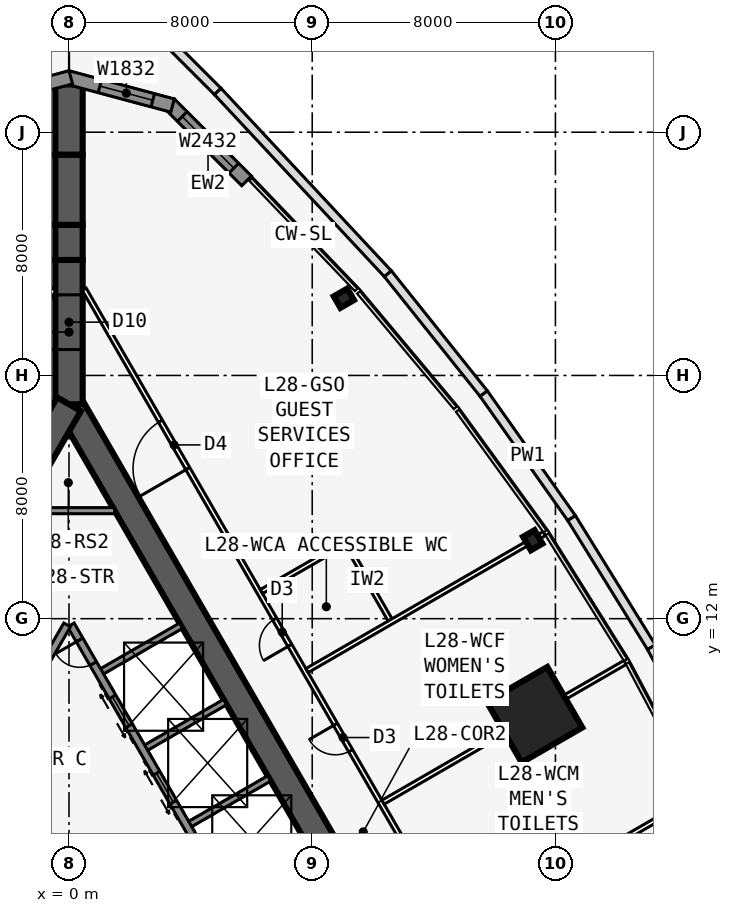
"""IFC4 building model, lengths in metres.
Left out: names, types, materials, properties, quantities, classifications, styles, units other than length and angle.
Written with IfcOpenShell. Run it as: python <this file> out.ifc"""

import sys

from ifc_helpers import new_model, si_unit, direction, frame, frame_2d, origin, origin_2d, place, context, subcontext, project, spatial, polyline, rectangle, i_section, outline, extrude, element, fill, save


model = new_model("IFC4")
c1 = context("Model", 3, precision=1e-05, world=origin(), true_north=direction((0.0, 1.0)))
c2 = subcontext(c1, "Body", "Model", "MODEL_VIEW")
j1 = project(units=[si_unit("LENGTHUNIT", "METRE"), si_unit("PLANEANGLEUNIT", "RADIAN")], contexts=[c1])
p1 = place(None, origin())
s1 = spatial("IfcSite", under=j1, at=p1, CompositionType="ELEMENT")
p2 = place(p1, origin())
s2 = spatial("IfcBuilding", under=s1, at=p2, CompositionType="ELEMENT")
p3 = place(p2, frame((0.0, 0.0, 109.7)))
s3 = spatial("IfcBuildingStorey", under=s2, at=p3, CompositionType="ELEMENT", Elevation=109.7)
p4 = place(p3, frame((16.5, -9.526, 0.0), z_axis=(0.0, 0.0, 1.0), x_axis=(-0.499999749417, 0.866025548458, 0.0)))
e1 = element("IfcWall", 1, at=p4, inside=s3, PredefinedType="SHEAR", context=c2, shape_type="SweptSolid", body=[
    extrude(rectangle(XDim=33.0, YDim=0.9, at=frame_2d((16.5, 0.0))), origin(), (0.0, 0.0, 1.0), 5.0),
])
p5 = place(p4, frame((14.15, 0.0, 0.0)))
e2 = element("IfcOpeningElement", 2, at=p5, cuts=e1, PredefinedType="OPENING", context=c2, shape_type="SweptSolid", body=[
    extrude(rectangle(XDim=1.8, YDim=2.13, at=frame_2d((0.9, 1.065))), frame((0.0, 0.46, 0.0), z_axis=(0.0, -1.0, 0.0), x_axis=(1.0, 0.0, 0.0)), (0.0, 0.0, 1.0), 0.92),
])
p6 = place(p4, frame((12.6, 0.0, 0.0)))
e3 = element("IfcOpeningElement", 3, at=p6, cuts=e1, PredefinedType="OPENING", context=c2, shape_type="SweptSolid", body=[
    extrude(rectangle(XDim=1.0, YDim=2.13, at=frame_2d((0.5, 1.065))), frame((0.0, 0.46, 0.0), z_axis=(0.0, -1.0, 0.0), x_axis=(1.0, 0.0, 0.0)), (0.0, 0.0, 1.0), 0.92),
])
p7 = place(p3, frame((5.379, 2.586, 0.0), z_axis=(0.0, 0.0, 1.0), x_axis=(-0.500001375892, 0.866024609411, 0.0)))
e4 = element("IfcWall", 4, at=p7, inside=s3, PredefinedType="SOLIDWALL", context=c2, shape_type="SweptSolid", body=[
    extrude(rectangle(XDim=10.633, YDim=0.25, at=frame_2d((5.316, 0.0))), origin(), (0.0, 0.0, 1.0), 4.835),
])
p8 = place(p7, frame((9.164, 0.0, 0.0)))
e5 = element("IfcOpeningElement", 5, at=p8, cuts=e4, PredefinedType="OPENING", context=c2, shape_type="SweptSolid", body=[
    extrude(rectangle(XDim=0.9, YDim=2.13, at=frame_2d((0.45, 1.065))), frame((0.0, 0.135, 0.0), z_axis=(0.0, -1.0, 0.0), x_axis=(1.0, 0.0, 0.0)), (0.0, 0.0, 1.0), 0.27),
])
p9 = place(p7, frame((1.0, 0.0, 0.0)))
e6 = element("IfcOpeningElement", 6, at=p9, cuts=e4, PredefinedType="OPENING", context=c2, shape_type="SweptSolid", body=[
    extrude(rectangle(XDim=1.1, YDim=2.13, at=frame_2d((0.55, 1.065))), frame((0.0, 0.135, 0.0), z_axis=(0.0, -1.0, 0.0), x_axis=(1.0, 0.0, 0.0)), (0.0, 0.0, 1.0), 0.27),
])
p10 = place(p7, frame((3.9, 0.0, 0.0)))
e7 = element("IfcOpeningElement", 7, at=p10, cuts=e4, PredefinedType="OPENING", context=c2, shape_type="SweptSolid", body=[
    extrude(rectangle(XDim=1.1, YDim=2.13, at=frame_2d((0.55, 1.065))), frame((0.0, 0.135, 0.0), z_axis=(0.0, -1.0, 0.0), x_axis=(1.0, 0.0, 0.0)), (0.0, 0.0, 1.0), 0.27),
])
p11 = place(p7, frame((6.8, 0.0, 0.0)))
e8 = element("IfcOpeningElement", 8, at=p11, cuts=e4, PredefinedType="OPENING", context=c2, shape_type="SweptSolid", body=[
    extrude(rectangle(XDim=1.1, YDim=2.13, at=frame_2d((0.55, 1.065))), frame((0.0, 0.135, 0.0), z_axis=(0.0, -1.0, 0.0), x_axis=(1.0, 0.0, 0.0)), (0.0, 0.0, 1.0), 0.27),
])
for number, where, z_axis, x_axis in (
    (9, (3.879, 5.184, 0.0), (0.0, 0.0, 1.0), (0.866, 0.5, 0.0)),
    (10, (2.429, 7.696, 0.0), (0.0, 0.0, 1.0), (0.866, 0.5, 0.0)),
    (11, (0.979, 10.207, 0.0), (0.0, 0.0, 1.0), (0.866, 0.5, 0.0)),
):
    element("IfcWall", number, at=place(p3, frame(where, z_axis=z_axis, x_axis=x_axis)), inside=s3, PredefinedType="SOLIDWALL", context=c2, shape_type="SweptSolid", body=[
        extrude(rectangle(XDim=3.125, YDim=0.2, at=frame_2d((1.562, 0.0))), origin(), (0.0, 0.0, 1.0), 4.835),
    ])
p12 = place(p3, frame((0.0, 19.052, 0.0), z_axis=(0.0, 0.0, 1.0), x_axis=(-0.499999749417, -0.866025548458, 0.0)))
e12 = element("IfcWall", 12, at=p12, inside=s3, PredefinedType="SHEAR", context=c2, shape_type="SweptSolid", body=[
    extrude(rectangle(XDim=33.0, YDim=0.9, at=frame_2d((16.5, 0.0))), origin(), (0.0, 0.0, 1.0), 5.0),
])
p13 = place(p12, frame((14.15, 0.0, 0.0)))
e13 = element("IfcOpeningElement", 13, at=p13, cuts=e12, PredefinedType="OPENING", context=c2, shape_type="SweptSolid", body=[
    extrude(rectangle(XDim=1.8, YDim=2.13, at=frame_2d((0.9, 1.065))), frame((0.0, 0.46, 0.0), z_axis=(0.0, -1.0, 0.0), x_axis=(1.0, 0.0, 0.0)), (0.0, 0.0, 1.0), 0.92),
])
p14 = place(p12, frame((12.6, 0.0, 0.0)))
e14 = element("IfcOpeningElement", 14, at=p14, cuts=e12, PredefinedType="OPENING", context=c2, shape_type="SweptSolid", body=[
    extrude(rectangle(XDim=1.0, YDim=2.13, at=frame_2d((0.5, 1.065))), frame((0.0, 0.46, 0.0), z_axis=(0.0, -1.0, 0.0), x_axis=(1.0, 0.0, 0.0)), (0.0, 0.0, 1.0), 0.92),
])
p15 = place(p3, frame((-0.062, 11.794, 0.0), z_axis=(0.0, 0.0, 1.0), x_axis=(-0.500006680225, -0.86602154692, 0.0)))
e15 = element("IfcWall", 15, at=p15, inside=s3, PredefinedType="SOLIDWALL", context=c2, shape_type="SweptSolid", body=[
    extrude(rectangle(XDim=7.733, YDim=0.25, at=frame_2d((3.866, 0.0))), origin(), (0.0, 0.0, 1.0), 4.835),
])
p16 = place(p3, frame((0.0, 19.052, 0.0), z_axis=(0.0, 0.0, 1.0), x_axis=(0.0, 1.0, 0.0)))
e16 = element("IfcWall", 16, at=p16, inside=s3, PredefinedType="SHEAR", context=c2, shape_type="SweptSolid", body=[
    extrude(rectangle(XDim=4.746, YDim=0.9, at=frame_2d((2.373, 0.0))), origin(), (0.0, 0.0, 1.0), 5.0),
])
p17 = place(p16, frame((1.8, 0.0, 0.0)))
e17 = element("IfcOpeningElement", 17, at=p17, cuts=e16, PredefinedType="OPENING", context=c2, shape_type="SweptSolid", body=[
    extrude(rectangle(XDim=1.8, YDim=2.13, at=frame_2d((0.9, 1.065))), frame((0.0, 0.46, 0.0), z_axis=(0.0, -1.0, 0.0), x_axis=(1.0, 0.0, 0.0)), (0.0, 0.0, 1.0), 0.92),
])
p18 = place(p3, frame((0.0, 23.799, 0.0), z_axis=(0.0, 0.0, 1.0), x_axis=(0.0, 1.0, 0.0)))
e18 = element("IfcWall", 18, at=p18, inside=s3, PredefinedType="SHEAR", context=c2, shape_type="SweptSolid", body=[
    extrude(rectangle(XDim=1.155, YDim=0.9, at=frame_2d((0.577, 0.0))), origin(), (0.0, 0.0, 1.0), 5.0),
])
p19 = place(p3, frame((0.0, 24.953, 0.0), z_axis=(0.0, 0.0, 1.0), x_axis=(0.0, 1.0, 0.0)))
e19 = element("IfcWall", 19, at=p19, inside=s3, PredefinedType="SHEAR", context=c2, shape_type="SweptSolid", body=[
    extrude(rectangle(XDim=2.309, YDim=0.9, at=frame_2d((1.155, 0.0))), origin(), (0.0, 0.0, 1.0), 5.0),
])
p20 = place(p3, frame((0.0, 27.263, 0.0), z_axis=(0.0, 0.0, 1.0), x_axis=(0.0, 1.0, 0.0)))
e20 = element("IfcWall", 20, at=p20, inside=s3, PredefinedType="SHEAR", context=c2, shape_type="SweptSolid", body=[
    extrude(rectangle(XDim=2.31, YDim=0.9, at=frame_2d((1.155, 0.0))), origin(), (0.0, 0.0, 1.0), 5.0),
])
for number, where, z_axis, x_axis in (
    (21, (15.254, 14.58, 0.0), (0.0, 0.0, 1.0), (0.866, 0.5, 0.0)),
    (22, (9.041, 22.541, 0.0), (0.0, 0.0, 1.0), (-0.5, 0.866, 0.0)),
):
    element("IfcColumn", number, at=place(p3, frame(where, z_axis=z_axis, x_axis=x_axis)), inside=s3, PredefinedType="COLUMN", context=c2, shape_type="SweptSolid", body=[
        extrude(i_section(OverallWidth=0.437, OverallDepth=0.513, WebThickness=0.061, FlangeThickness=0.097, at=origin_2d()), origin(), (0.0, 0.0, 1.0), 5.0),
    ])
p21 = place(p3, frame((15.312, 8.84, 0.0), z_axis=(0.0, 0.0, 1.0), x_axis=(0.866025403784, 0.5, 0.0)))
e23 = element("IfcColumn", 23, at=p21, inside=s3, PredefinedType="COLUMN", context=c2, shape_type="SweptSolid", body=[
    extrude(rectangle(XDim=2.3, YDim=2.3, at=origin_2d()), origin(), (0.0, 0.0, 1.0), 5.0),
])
p22 = place(p3, frame((5.841, 26.399, 0.0), z_axis=(0.0, 0.0, 1.0), x_axis=(-0.707106781187, 0.707106781187, 0.0)))
e24 = element("IfcWall", 24, at=p22, inside=s3, PredefinedType="SOLIDWALL", context=c2, shape_type="SweptSolid", body=[
    extrude(rectangle(XDim=3.586, YDim=0.45, at=frame_2d((1.793, 0.0))), origin(), (0.0, 0.0, 1.0), 4.835),
])
p23 = place(p22, frame((0.593, 0.0, 0.6)))
e25 = element("IfcOpeningElement", 25, at=p23, cuts=e24, PredefinedType="OPENING", context=c2, shape_type="SweptSolid", body=[
    extrude(rectangle(XDim=2.4, YDim=3.2, at=frame_2d((1.2, 1.6))), frame((0.0, 0.235, 0.0), z_axis=(0.0, -1.0, 0.0), x_axis=(1.0, 0.0, 0.0)), (0.0, 0.0, 1.0), 0.47),
])
p24 = place(p3, frame((3.406, 28.877, 0.0), z_axis=(0.0, 0.0, 1.0), x_axis=(-0.965924653531, 0.258823421857, 0.0)))
e26 = element("IfcWall", 26, at=p24, inside=s3, PredefinedType="SOLIDWALL", context=c2, shape_type="SweptSolid", body=[
    extrude(outline(polyline([(3.586, 0.225), (3.527, 0.225), (3.035, 0.093), (3.0, 0.225), (0.0, 0.225), (0.0, -0.225), (3.586, -0.225), (3.586, 0.225)])), origin(), (0.0, 0.0, 1.0), 4.835),
])
p25 = place(p24, frame((0.674, 0.0, 0.6)))
e27 = element("IfcOpeningElement", 27, at=p25, cuts=e26, PredefinedType="OPENING", context=c2, shape_type="SweptSolid", body=[
    extrude(rectangle(XDim=1.8, YDim=3.2, at=frame_2d((0.9, 1.6))), frame((0.0, 0.235, 0.0), z_axis=(0.0, -1.0, 0.0), x_axis=(1.0, 0.0, 0.0)), (0.0, 0.0, 1.0), 0.47),
])
p26 = place(p3, frame((0.058, 29.805, 0.0), z_axis=(0.0, 0.0, 1.0), x_axis=(-0.965924653531, -0.258823421857, 0.0)))
e28 = element("IfcWall", 28, at=p26, inside=s3, PredefinedType="SOLIDWALL", context=c2, shape_type="SweptSolid", body=[
    extrude(outline(polyline([(3.586, 0.225), (0.586, 0.225), (0.551, 0.093), (0.06, 0.225), (0.0, 0.225), (0.0, -0.225), (3.586, -0.225), (3.586, 0.225)])), origin(), (0.0, 0.0, 1.0), 4.835),
])
p27 = place(p26, frame((1.111, 0.0, 0.6)))
e29 = element("IfcOpeningElement", 29, at=p27, cuts=e28, PredefinedType="OPENING", context=c2, shape_type="SweptSolid", body=[
    extrude(rectangle(XDim=1.8, YDim=3.2, at=frame_2d((0.9, 1.6))), frame((0.0, 0.235, 0.0), z_axis=(0.0, -1.0, 0.0), x_axis=(1.0, 0.0, 0.0)), (0.0, 0.0, 1.0), 0.47),
])
p28 = place(p3, frame((2.809, 31.424, 0.0), z_axis=(0.0, 0.0, 1.0), x_axis=(0.707148220913, -0.707065339031, 0.0)))
e30 = element("IfcWall", 30, at=p28, inside=s3, PredefinedType="PARAPET", context=c2, shape_type="SweptSolid", body=[
    extrude(rectangle(XDim=2.946, YDim=0.3, at=frame_2d((1.473, 0.0))), origin(), (0.0, 0.0, 1.0), 1.1),
])
p29 = place(p3, frame((4.892, 29.341, 0.0), z_axis=(0.0, 0.0, 1.0), x_axis=(0.682295981494, -0.731076051883, 0.0)))
e31 = element("IfcWall", 31, at=p29, inside=s3, PredefinedType="PARAPET", context=c2, shape_type="SweptSolid", body=[
    extrude(rectangle(XDim=8.203, YDim=0.3, at=frame_2d((4.102, 0.0))), origin(), (0.0, 0.0, 1.0), 1.1),
])
p30 = place(p3, frame((10.489, 23.344, 0.0), z_axis=(0.0, 0.0, 1.0), x_axis=(0.624606561164, -0.780939590334, 0.0)))
e32 = element("IfcWall", 32, at=p30, inside=s3, PredefinedType="PARAPET", context=c2, shape_type="SweptSolid", body=[
    extrude(rectangle(XDim=5.047, YDim=0.3, at=frame_2d((2.524, 0.0))), origin(), (0.0, 0.0, 1.0), 1.1),
])
p31 = place(p3, frame((13.642, 19.402, 0.0), z_axis=(0.0, 0.0, 1.0), x_axis=(0.576639207024, -0.816998913661, 0.0)))
e33 = element("IfcWall", 33, at=p31, inside=s3, PredefinedType="PARAPET", context=c2, shape_type="SweptSolid", body=[
    extrude(rectangle(XDim=5.012, YDim=0.3, at=frame_2d((2.506, 0.0))), origin(), (0.0, 0.0, 1.0), 1.1),
])
p32 = place(p3, frame((16.531, 15.308, 0.0), z_axis=(0.0, 0.0, 1.0), x_axis=(0.526139147264, -0.850398493482, 0.0)))
e34 = element("IfcWall", 34, at=p32, inside=s3, PredefinedType="PARAPET", context=c2, shape_type="SweptSolid", body=[
    extrude(rectangle(XDim=4.993, YDim=0.3, at=frame_2d((2.497, 0.0))), origin(), (0.0, 0.0, 1.0), 1.1),
])
p33 = place(p3, frame((19.159, 11.061, 0.0), z_axis=(0.0, 0.0, 1.0), x_axis=(0.473402806561, -0.880846060751, 0.0)))
e35 = element("IfcWall", 35, at=p33, inside=s3, PredefinedType="PARAPET", context=c2, shape_type="SweptSolid", body=[
    extrude(rectangle(XDim=4.993, YDim=0.3, at=frame_2d((2.497, 0.0))), origin(), (0.0, 0.0, 1.0), 1.1),
])
p34 = place(p3, frame((20.027, -10.985, 0.0), z_axis=(0.0, 0.0, 1.0), x_axis=(-0.500001677587, 0.866024435227, 0.0)))
e36 = element("IfcWall", 36, at=p34, inside=s3, PredefinedType="PARTITIONING", context=c2, shape_type="SweptSolid", body=[
    extrude(rectangle(XDim=39.054, YDim=0.15, at=frame_2d((19.527, 0.0))), origin(), (0.0, 0.0, 1.0), 4.835),
])
p35 = place(p34, frame((6.513, 0.0, 0.0)))
e37 = element("IfcOpeningElement", 37, at=p35, cuts=e36, PredefinedType="OPENING", context=c2, shape_type="SweptSolid", body=[
    extrude(rectangle(XDim=1.8, YDim=2.13, at=frame_2d((0.9, 1.065))), frame((0.0, 0.085, 0.0), z_axis=(0.0, -1.0, 0.0), x_axis=(1.0, 0.0, 0.0)), (0.0, 0.0, 1.0), 0.17),
])
p36 = place(p34, frame((16.527, 0.0, 0.0)))
e38 = element("IfcOpeningElement", 38, at=p36, cuts=e36, PredefinedType="OPENING", context=c2, shape_type="SweptSolid", body=[
    extrude(rectangle(XDim=1.0, YDim=2.13, at=frame_2d((0.5, 1.065))), frame((0.0, 0.085, 0.0), z_axis=(0.0, -1.0, 0.0), x_axis=(1.0, 0.0, 0.0)), (0.0, 0.0, 1.0), 0.17),
])
p37 = place(p34, frame((21.527, 0.0, 0.0)))
e39 = element("IfcOpeningElement", 39, at=p37, cuts=e36, PredefinedType="OPENING", context=c2, shape_type="SweptSolid", body=[
    extrude(rectangle(XDim=1.0, YDim=2.13, at=frame_2d((0.5, 1.065))), frame((0.0, 0.085, 0.0), z_axis=(0.0, -1.0, 0.0), x_axis=(1.0, 0.0, 0.0)), (0.0, 0.0, 1.0), 0.17),
])
p38 = place(p34, frame((25.527, 0.0, 0.0)))
e40 = element("IfcOpeningElement", 40, at=p38, cuts=e36, PredefinedType="OPENING", context=c2, shape_type="SweptSolid", body=[
    extrude(rectangle(XDim=1.0, YDim=2.13, at=frame_2d((0.5, 1.065))), frame((0.0, 0.085, 0.0), z_axis=(0.0, -1.0, 0.0), x_axis=(1.0, 0.0, 0.0)), (0.0, 0.0, 1.0), 0.17),
])
p39 = place(p34, frame((32.24, 0.0, 0.0)))
e41 = element("IfcOpeningElement", 41, at=p39, cuts=e36, PredefinedType="OPENING", context=c2, shape_type="SweptSolid", body=[
    extrude(rectangle(XDim=1.8, YDim=2.13, at=frame_2d((0.9, 1.065))), frame((0.0, 0.085, 0.0), z_axis=(0.0, -1.0, 0.0), x_axis=(1.0, 0.0, 0.0)), (0.0, 0.0, 1.0), 0.17),
])
p40 = place(p3, frame((12.829, 1.633, 0.0), z_axis=(0.0, 0.0, 1.0), x_axis=(0.866028563435, 0.499994527285, 0.0)))
e42 = element("IfcWall", 42, at=p40, inside=s3, PredefinedType="PARTITIONING", context=c2, shape_type="SweptSolid", body=[
    extrude(rectangle(XDim=9.01, YDim=0.15, at=frame_2d((4.505, 0.0))), origin(), (0.0, 0.0, 1.0), 3.989),
])
p41 = place(p3, frame((10.329, 5.963, 0.0), z_axis=(0.0, 0.0, 1.0), x_axis=(0.866017936952, 0.500012932711, 0.0)))
e43 = element("IfcWall", 43, at=p41, inside=s3, PredefinedType="PARTITIONING", context=c2, shape_type="SweptSolid", body=[
    extrude(rectangle(XDim=9.191, YDim=0.15, at=frame_2d((4.596, 0.0))), origin(), (0.0, 0.0, 1.0), 3.989),
])
p42 = place(p3, frame((7.829, 10.293, 0.0), z_axis=(0.0, 0.0, 1.0), x_axis=(0.866010056275, 0.500026581724, 0.0)))
e44 = element("IfcWall", 44, at=p42, inside=s3, PredefinedType="PARTITIONING", context=c2, shape_type="SweptSolid", body=[
    extrude(rectangle(XDim=9.01, YDim=0.15, at=frame_2d((4.505, 0.0))), origin(), (0.0, 0.0, 1.0), 3.989),
])
p43 = place(p3, frame((10.562, 11.958, 0.0), z_axis=(0.0, 0.0, 1.0), x_axis=(-0.499990139034, 0.866031096941, 0.0)))
e45 = element("IfcWall", 45, at=p43, inside=s3, PredefinedType="PARTITIONING", context=c2, shape_type="SweptSolid", body=[
    extrude(rectangle(XDim=3.0, YDim=0.15, at=frame_2d((1.5, 0.0))), origin(), (0.0, 0.0, 1.0), 4.835),
])
p44 = place(p3, frame((6.329, 12.891, 0.0), z_axis=(0.0, 0.0, 1.0), x_axis=(0.866022959057, 0.500004234368, 0.0)))
e46 = element("IfcWall", 46, at=p44, inside=s3, PredefinedType="PARTITIONING", context=c2, shape_type="SweptSolid", body=[
    extrude(rectangle(XDim=3.125, YDim=0.15, at=frame_2d((1.562, 0.0))), origin(), (0.0, 0.0, 1.0), 4.835),
])
p45 = place(p3, frame((-0.5, 22.836, 0.0), z_axis=(0.0, 0.0, 1.0), x_axis=(-0.500001677587, -0.866024435227, 0.0)))
e47 = element("IfcWall", 47, at=p45, inside=s3, PredefinedType="PARTITIONING", context=c2, shape_type="SweptSolid", body=[
    extrude(rectangle(XDim=39.054, YDim=0.15, at=frame_2d((19.527, 0.0))), origin(), (0.0, 0.0, 1.0), 4.835),
])
p46 = place(p45, frame((6.414, 0.0, 0.0)))
e48 = element("IfcOpeningElement", 48, at=p46, cuts=e47, PredefinedType="OPENING", context=c2, shape_type="SweptSolid", body=[
    extrude(rectangle(XDim=1.0, YDim=2.13, at=frame_2d((0.5, 1.065))), frame((0.0, 0.085, 0.0), z_axis=(0.0, -1.0, 0.0), x_axis=(1.0, 0.0, 0.0)), (0.0, 0.0, 1.0), 0.17),
])
p47 = place(p45, frame((15.527, 0.0, 0.0)))
e49 = element("IfcOpeningElement", 49, at=p47, cuts=e47, PredefinedType="OPENING", context=c2, shape_type="SweptSolid", body=[
    extrude(rectangle(XDim=1.0, YDim=2.13, at=frame_2d((0.5, 1.065))), frame((0.0, 0.085, 0.0), z_axis=(0.0, -1.0, 0.0), x_axis=(1.0, 0.0, 0.0)), (0.0, 0.0, 1.0), 0.17),
])
p48 = place(p45, frame((21.277, 0.0, 0.0)))
e50 = element("IfcOpeningElement", 50, at=p48, cuts=e47, PredefinedType="OPENING", context=c2, shape_type="SweptSolid", body=[
    extrude(rectangle(XDim=1.0, YDim=2.13, at=frame_2d((0.5, 1.065))), frame((0.0, 0.085, 0.0), z_axis=(0.0, -1.0, 0.0), x_axis=(1.0, 0.0, 0.0)), (0.0, 0.0, 1.0), 0.17),
])
p49 = place(p45, frame((31.39, 0.0, 0.0)))
e51 = element("IfcOpeningElement", 51, at=p49, cuts=e47, PredefinedType="OPENING", context=c2, shape_type="SweptSolid", body=[
    extrude(rectangle(XDim=1.0, YDim=2.13, at=frame_2d((0.5, 1.065))), frame((0.0, 0.085, 0.0), z_axis=(0.0, -1.0, 0.0), x_axis=(1.0, 0.0, 0.0)), (0.0, 0.0, 1.0), 0.17),
])
p50 = place(p3, frame((-1.501, 15.552, 0.0), z_axis=(0.0, 0.0, 1.0), x_axis=(1.0, 0.0, 0.0)))
e52 = element("IfcWall", 52, at=p50, inside=s3, PredefinedType="SOLIDWALL", context=c2, shape_type="SweptSolid", body=[
    extrude(rectangle(XDim=3.002, YDim=0.2, at=frame_2d((1.501, 0.0))), origin(), (0.0, 0.0, 1.0), 4.835),
])
p51 = place(p23, origin())
e53 = element("IfcWindow", 53, at=p51, inside=s3, PartitioningType="SINGLE_PANEL", PredefinedType="WINDOW", context=c2, shape_type="SweptSolid", body=[
    extrude(rectangle(XDim=2.4, YDim=3.2, at=frame_2d((1.2, 1.6))), frame((0.0, 0.03, 0.0), z_axis=(0.0, -1.0, 0.0), x_axis=(1.0, 0.0, 0.0)), (0.0, 0.0, 1.0), 0.06),
])
fill(e25, e53)
p52 = place(p25, origin())
e54 = element("IfcWindow", 54, at=p52, inside=s3, PartitioningType="SINGLE_PANEL", PredefinedType="WINDOW", context=c2, shape_type="SweptSolid", body=[
    extrude(rectangle(XDim=1.8, YDim=3.2, at=frame_2d((0.9, 1.6))), frame((0.0, 0.03, 0.0), z_axis=(0.0, -1.0, 0.0), x_axis=(1.0, 0.0, 0.0)), (0.0, 0.0, 1.0), 0.06),
])
fill(e27, e54)
p53 = place(p37, origin())
e55 = element("IfcDoor", 55, at=p53, inside=s3, OperationType="SINGLE_SWING_RIGHT", PredefinedType="DOOR", context=c2, shape_type="SweptSolid", body=[
    extrude(rectangle(XDim=1.0, YDim=2.13, at=frame_2d((0.5, 1.065))), frame((0.0, 0.025, 0.0), z_axis=(0.0, -1.0, 0.0), x_axis=(1.0, 0.0, 0.0)), (0.0, 0.0, 1.0), 0.05),
])
fill(e39, e55)
p54 = place(p38, origin())
e56 = element("IfcDoor", 56, at=p54, inside=s3, OperationType="SINGLE_SWING_LEFT", PredefinedType="DOOR", context=c2, shape_type="SweptSolid", body=[
    extrude(rectangle(XDim=1.0, YDim=2.13, at=frame_2d((0.5, 1.065))), frame((0.0, 0.025, 0.0), z_axis=(0.0, -1.0, 0.0), x_axis=(1.0, 0.0, 0.0)), (0.0, 0.0, 1.0), 0.05),
])
fill(e40, e56)
p55 = place(p39, origin())
e57 = element("IfcDoor", 57, at=p55, inside=s3, OperationType="DOUBLE_DOOR_SINGLE_SWING", PredefinedType="DOOR", context=c2, shape_type="SweptSolid", body=[
    extrude(rectangle(XDim=1.8, YDim=2.13, at=frame_2d((0.9, 1.065))), frame((0.0, 0.025, 0.0), z_axis=(0.0, -1.0, 0.0), x_axis=(1.0, 0.0, 0.0)), (0.0, 0.0, 1.0), 0.05),
])
fill(e41, e57)
p56 = place(p17, origin())
e58 = element("IfcDoor", 58, at=p56, inside=s3, OperationType="DOUBLE_DOOR_DOUBLE_SWING", PredefinedType="DOOR", context=c2, shape_type="SweptSolid", body=[
    extrude(rectangle(XDim=1.8, YDim=2.13, at=frame_2d((0.9, 1.065))), frame((0.0, 0.025, 0.0), z_axis=(0.0, -1.0, 0.0), x_axis=(1.0, 0.0, 0.0)), (0.0, 0.0, 1.0), 0.05),
])
fill(e17, e58)
p57 = place(p8, origin())
e59 = element("IfcDoor", 59, at=p57, inside=s3, OperationType="SINGLE_SWING_RIGHT", PredefinedType="DOOR", context=c2, shape_type="SweptSolid", body=[
    extrude(rectangle(XDim=0.9, YDim=2.13, at=frame_2d((0.45, 1.065))), frame((0.0, 0.025, 0.0), z_axis=(0.0, -1.0, 0.0), x_axis=(1.0, 0.0, 0.0)), (0.0, 0.0, 1.0), 0.05),
])
fill(e5, e59)
p58 = place(p10, origin())
e60 = element("IfcDoor", 60, at=p58, inside=s3, OperationType="DOUBLE_DOOR_SLIDING", PredefinedType="USERDEFINED", context=c2, shape_type="SweptSolid", body=[
    extrude(rectangle(XDim=1.1, YDim=2.13, at=frame_2d((0.55, 1.065))), frame((0.0, 0.025, 0.0), z_axis=(0.0, -1.0, 0.0), x_axis=(1.0, 0.0, 0.0)), (0.0, 0.0, 1.0), 0.05),
])
fill(e7, e60)
p59 = place(p11, origin())
e61 = element("IfcDoor", 61, at=p59, inside=s3, OperationType="DOUBLE_DOOR_SLIDING", PredefinedType="USERDEFINED", context=c2, shape_type="SweptSolid", body=[
    extrude(rectangle(XDim=1.1, YDim=2.13, at=frame_2d((0.55, 1.065))), frame((0.0, 0.025, 0.0), z_axis=(0.0, -1.0, 0.0), x_axis=(1.0, 0.0, 0.0)), (0.0, 0.0, 1.0), 0.05),
])
fill(e8, e61)
save(model, sys.argv[1])
